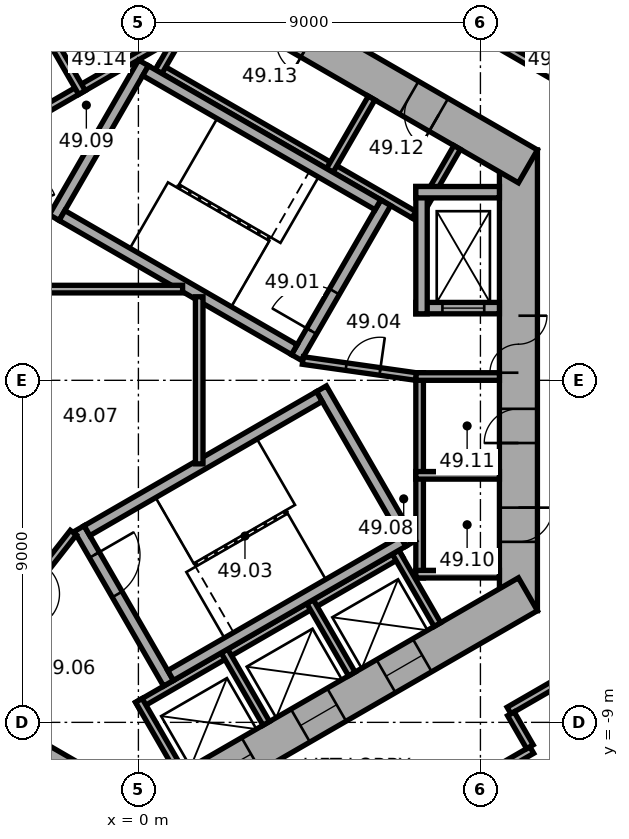
"""IFC4 building model, lengths in metres.
Left out: names, types, materials, properties, quantities, classifications, styles, units other than length and angle.
Written with IfcOpenShell. Run it as: python <this file> out.ifc"""

import sys

from ifc_helpers import new_model, si_unit, direction, frame, frame_2d, origin, place, context, subcontext, project, spatial, rectangle, extrude, element, fill, save


model = new_model("IFC4")
c1 = context("Model", 3, precision=1e-05, world=origin(), true_north=direction((0.0, 1.0)))
c2 = subcontext(c1, "Body", "Model", "MODEL_VIEW")
j1 = project(units=[si_unit("LENGTHUNIT", "METRE"), si_unit("PLANEANGLEUNIT", "RADIAN")], contexts=[c1])
p1 = place(None, origin())
s1 = spatial("IfcSite", under=j1, at=p1, CompositionType="ELEMENT")
p2 = place(p1, origin())
s2 = spatial("IfcBuilding", under=s1, at=p2, CompositionType="ELEMENT")
p3 = place(p2, frame((0.0, 0.0, 198.4)))
s3 = spatial("IfcBuildingStorey", under=s2, at=p3, CompositionType="ELEMENT", Elevation=198.4)
p4 = place(p3, frame((10.0, -6.062, 0.0), z_axis=(0.0, 0.0, 1.0), x_axis=(0.0, 1.0, 0.0)))
e1 = element("IfcWall", 1, at=p4, inside=s3, PredefinedType="SHEAR", context=c2, shape_type="SweptSolid", body=[
    extrude(rectangle(XDim=12.125, YDim=1.0, at=frame_2d((6.062, 0.0))), origin(), (0.0, 0.0, 1.0), 3.7),
])
p5 = place(p4, frame((6.262, 0.0, 0.0)))
e2 = element("IfcOpeningElement", 2, at=p5, cuts=e1, PredefinedType="OPENING", context=c2, shape_type="SweptSolid", body=[
    extrude(rectangle(XDim=1.5, YDim=2.1, at=frame_2d((0.75, 1.05))), frame((0.0, 0.51, 0.0), z_axis=(0.0, -1.0, 0.0), x_axis=(1.0, 0.0, 0.0)), (0.0, 0.0, 1.0), 1.02),
])
p6 = place(p4, frame((1.812, 0.0, 0.0)))
e3 = element("IfcOpeningElement", 3, at=p6, cuts=e1, PredefinedType="OPENING", context=c2, shape_type="SweptSolid", body=[
    extrude(rectangle(XDim=0.9, YDim=2.1, at=frame_2d((0.45, 1.05))), frame((0.0, 0.51, 0.0), z_axis=(0.0, -1.0, 0.0), x_axis=(1.0, 0.0, 0.0)), (0.0, 0.0, 1.0), 1.02),
])
p7 = place(p4, frame((4.412, 0.0, 0.0)))
e4 = element("IfcOpeningElement", 4, at=p7, cuts=e1, PredefinedType="OPENING", context=c2, shape_type="SweptSolid", body=[
    extrude(rectangle(XDim=0.9, YDim=2.1, at=frame_2d((0.45, 1.05))), frame((0.0, 0.51, 0.0), z_axis=(0.0, -1.0, 0.0), x_axis=(1.0, 0.0, 0.0)), (0.0, 0.0, 1.0), 1.02),
])
p8 = place(p3, frame((10.25, 5.629, 0.0), z_axis=(0.0, 0.0, 1.0), x_axis=(-0.866022616891, 0.50000482701, 0.0)))
e5 = element("IfcWall", 5, at=p8, inside=s3, PredefinedType="SHEAR", context=c2, shape_type="SweptSolid", body=[
    extrude(rectangle(XDim=12.125, YDim=1.0, at=frame_2d((6.062, 0.0))), origin(), (0.0, 0.0, 1.0), 3.7),
])
p9 = place(p8, frame((2.712, 0.0, 0.0)))
e6 = element("IfcOpeningElement", 6, at=p9, cuts=e5, PredefinedType="OPENING", context=c2, shape_type="SweptSolid", body=[
    extrude(rectangle(XDim=0.9, YDim=2.1, at=frame_2d((0.45, 1.05))), frame((0.0, 0.51, 0.0), z_axis=(0.0, -1.0, 0.0), x_axis=(1.0, 0.0, 0.0)), (0.0, 0.0, 1.0), 1.02),
])
p10 = place(p8, frame((6.612, 0.0, 0.0)))
e7 = element("IfcOpeningElement", 7, at=p10, cuts=e5, PredefinedType="OPENING", context=c2, shape_type="SweptSolid", body=[
    extrude(rectangle(XDim=0.9, YDim=2.1, at=frame_2d((0.45, 1.05))), frame((0.0, 0.51, 0.0), z_axis=(0.0, -1.0, 0.0), x_axis=(1.0, 0.0, 0.0)), (0.0, 0.0, 1.0), 1.02),
])
p11 = place(p3, frame((0.25, 11.691, 0.0), z_axis=(0.0, 0.0, 1.0), x_axis=(-0.866022616891, -0.50000482701, 0.0)))
e8 = element("IfcWall", 8, at=p11, inside=s3, PredefinedType="SHEAR", context=c2, shape_type="SweptSolid", body=[
    extrude(rectangle(XDim=12.125, YDim=1.0, at=frame_2d((6.062, 0.0))), origin(), (0.0, 0.0, 1.0), 3.7),
])
p12 = place(p11, frame((6.262, 0.0, 0.0)))
e9 = element("IfcOpeningElement", 9, at=p12, cuts=e8, PredefinedType="OPENING", context=c2, shape_type="SweptSolid", body=[
    extrude(rectangle(XDim=1.5, YDim=2.1, at=frame_2d((0.75, 1.05))), frame((0.0, 0.51, 0.0), z_axis=(0.0, -1.0, 0.0), x_axis=(1.0, 0.0, 0.0)), (0.0, 0.0, 1.0), 1.02),
])
p13 = place(p11, frame((1.812, 0.0, 0.0)))
e10 = element("IfcOpeningElement", 10, at=p13, cuts=e8, PredefinedType="OPENING", context=c2, shape_type="SweptSolid", body=[
    extrude(rectangle(XDim=0.9, YDim=2.1, at=frame_2d((0.45, 1.05))), frame((0.0, 0.51, 0.0), z_axis=(0.0, -1.0, 0.0), x_axis=(1.0, 0.0, 0.0)), (0.0, 0.0, 1.0), 1.02),
])
p14 = place(p11, frame((4.412, 0.0, 0.0)))
e11 = element("IfcOpeningElement", 11, at=p14, cuts=e8, PredefinedType="OPENING", context=c2, shape_type="SweptSolid", body=[
    extrude(rectangle(XDim=0.9, YDim=2.1, at=frame_2d((0.45, 1.05))), frame((0.0, 0.51, 0.0), z_axis=(0.0, -1.0, 0.0), x_axis=(1.0, 0.0, 0.0)), (0.0, 0.0, 1.0), 1.02),
])
p15 = place(p3, frame((-10.25, -5.629, 0.0), z_axis=(0.0, 0.0, 1.0), x_axis=(0.866022616891, -0.50000482701, 0.0)))
e12 = element("IfcWall", 12, at=p15, inside=s3, PredefinedType="SHEAR", context=c2, shape_type="SweptSolid", body=[
    extrude(rectangle(XDim=12.125, YDim=1.0, at=frame_2d((6.062, 0.0))), origin(), (0.0, 0.0, 1.0), 3.7),
])
p16 = place(p15, frame((6.262, 0.0, 0.0)))
e13 = element("IfcOpeningElement", 13, at=p16, cuts=e12, PredefinedType="OPENING", context=c2, shape_type="SweptSolid", body=[
    extrude(rectangle(XDim=1.5, YDim=2.1, at=frame_2d((0.75, 1.05))), frame((0.0, 0.51, 0.0), z_axis=(0.0, -1.0, 0.0), x_axis=(1.0, 0.0, 0.0)), (0.0, 0.0, 1.0), 1.02),
])
p17 = place(p15, frame((1.712, 0.0, 0.0)))
e14 = element("IfcOpeningElement", 14, at=p17, cuts=e12, PredefinedType="OPENING", context=c2, shape_type="SweptSolid", body=[
    extrude(rectangle(XDim=1.1, YDim=2.1, at=frame_2d((0.55, 1.05))), frame((0.0, 0.51, 0.0), z_axis=(0.0, -1.0, 0.0), x_axis=(1.0, 0.0, 0.0)), (0.0, 0.0, 1.0), 1.02),
])
p18 = place(p15, frame((4.312, 0.0, 0.0)))
e15 = element("IfcOpeningElement", 15, at=p18, cuts=e12, PredefinedType="OPENING", context=c2, shape_type="SweptSolid", body=[
    extrude(rectangle(XDim=1.1, YDim=2.1, at=frame_2d((0.55, 1.05))), frame((0.0, 0.51, 0.0), z_axis=(0.0, -1.0, 0.0), x_axis=(1.0, 0.0, 0.0)), (0.0, 0.0, 1.0), 1.02),
])
p19 = place(p3, frame((-0.25, -11.691, 0.0), z_axis=(0.0, 0.0, 1.0), x_axis=(0.866022616891, 0.50000482701, 0.0)))
e16 = element("IfcWall", 16, at=p19, inside=s3, PredefinedType="SHEAR", context=c2, shape_type="SweptSolid", body=[
    extrude(rectangle(XDim=12.125, YDim=1.0, at=frame_2d((6.062, 0.0))), origin(), (0.0, 0.0, 1.0), 3.7),
])
p20 = place(p19, frame((2.612, 0.0, 0.0)))
e17 = element("IfcOpeningElement", 17, at=p20, cuts=e16, PredefinedType="OPENING", context=c2, shape_type="SweptSolid", body=[
    extrude(rectangle(XDim=1.1, YDim=2.1, at=frame_2d((0.55, 1.05))), frame((0.0, 0.51, 0.0), z_axis=(0.0, -1.0, 0.0), x_axis=(1.0, 0.0, 0.0)), (0.0, 0.0, 1.0), 1.02),
])
p21 = place(p19, frame((5.212, 0.0, 0.0)))
e18 = element("IfcOpeningElement", 18, at=p21, cuts=e16, PredefinedType="OPENING", context=c2, shape_type="SweptSolid", body=[
    extrude(rectangle(XDim=1.1, YDim=2.1, at=frame_2d((0.55, 1.05))), frame((0.0, 0.51, 0.0), z_axis=(0.0, -1.0, 0.0), x_axis=(1.0, 0.0, 0.0)), (0.0, 0.0, 1.0), 1.02),
])
p22 = place(p19, frame((7.812, 0.0, 0.0)))
e19 = element("IfcOpeningElement", 19, at=p22, cuts=e16, PredefinedType="OPENING", context=c2, shape_type="SweptSolid", body=[
    extrude(rectangle(XDim=1.1, YDim=2.1, at=frame_2d((0.55, 1.05))), frame((0.0, 0.51, 0.0), z_axis=(0.0, -1.0, 0.0), x_axis=(1.0, 0.0, 0.0)), (0.0, 0.0, 1.0), 1.02),
])
p23 = place(p3, frame((7.4, -5.2, 0.0), z_axis=(0.0, 0.0, 1.0), x_axis=(0.0, 1.0, 0.0)))
e20 = element("IfcWall", 20, at=p23, inside=s3, PredefinedType="PARTITIONING", context=c2, shape_type="SweptSolid", body=[
    extrude(rectangle(XDim=5.4, YDim=0.2, at=frame_2d((2.7, 0.0))), origin(), (0.0, 0.0, 1.0), 3.42),
])
for number, where, z_axis, x_axis in (
    (21, (7.3, -5.1, 0.0), (0.0, 0.0, 1.0), (1.0, 0.0, 0.0)),
    (22, (7.3, -2.5, 0.0), (0.0, 0.0, 1.0), (1.0, 0.0, 0.0)),
    (23, (7.3, 0.1, 0.0), (0.0, 0.0, 1.0), (1.0, 0.0, 0.0)),
):
    element("IfcWall", number, at=place(p3, frame(where, z_axis=z_axis, x_axis=x_axis)), inside=s3, PredefinedType="PARTITIONING", context=c2, shape_type="SweptSolid", body=[
        extrude(rectangle(XDim=2.2, YDim=0.2, at=frame_2d((1.1, 0.0))), origin(), (0.0, 0.0, 1.0), 3.42),
    ])
p24 = place(p3, frame((7.424, 4.259, 0.0), z_axis=(0.0, 0.0, 1.0), x_axis=(-0.866026010844, 0.49999894854, 0.0)))
e24 = element("IfcWall", 24, at=p24, inside=s3, PredefinedType="PARTITIONING", context=c2, shape_type="SweptSolid", body=[
    extrude(rectangle(XDim=8.0, YDim=0.2, at=frame_2d((4.0, 0.0))), origin(), (0.0, 0.0, 1.0), 3.42),
])
for number, where, z_axis, x_axis in (
    (25, (7.287, 4.222, 0.0), (0.0, 0.0, 1.0), (0.5, 0.866, 0.0)),
    (26, (5.036, 5.522, 0.0), (0.0, 0.0, 1.0), (0.5, 0.866, 0.0)),
    (27, (0.532, 8.122, 0.0), (0.0, 0.0, 1.0), (0.5, 0.866, 0.0)),
):
    element("IfcWall", number, at=place(p3, frame(where, z_axis=z_axis, x_axis=x_axis)), inside=s3, PredefinedType="PARTITIONING", context=c2, shape_type="SweptSolid", body=[
        extrude(rectangle(XDim=2.2, YDim=0.2, at=frame_2d((1.1, 0.0))), origin(), (0.0, 0.0, 1.0), 3.42),
    ])
p25 = place(p3, frame((0.803, 9.009, 0.0), z_axis=(0.0, 0.0, 1.0), x_axis=(-0.866028230842, -0.499995103361, 0.0)))
e28 = element("IfcWall", 28, at=p25, inside=s3, PredefinedType="PARTITIONING", context=c2, shape_type="SweptSolid", body=[
    extrude(rectangle(XDim=5.4, YDim=0.2, at=frame_2d((2.7, 0.0))), origin(), (0.0, 0.0, 1.0), 3.42),
])
p26 = place(p3, frame((-1.485, 7.572, 0.0), z_axis=(0.0, 0.0, 1.0), x_axis=(-0.50002983664, 0.866008176907, 0.0)))
e29 = element("IfcWall", 29, at=p26, inside=s3, PredefinedType="PARTITIONING", context=c2, shape_type="SweptSolid", body=[
    extrude(rectangle(XDim=2.2, YDim=0.2, at=frame_2d((1.1, 0.0))), origin(), (0.0, 0.0, 1.0), 3.42),
])
p27 = place(p3, frame((-0.024, -8.559, 0.0), z_axis=(0.0, 0.0, 1.0), x_axis=(0.866026010844, 0.49999894854, 0.0)))
e30 = element("IfcWall", 30, at=p27, inside=s3, PredefinedType="PARTITIONING", context=c2, shape_type="SweptSolid", body=[
    extrude(rectangle(XDim=8.0, YDim=0.2, at=frame_2d((4.0, 0.0))), origin(), (0.0, 0.0, 1.0), 3.42),
])
for number, where, z_axis, x_axis in (
    (31, (0.013, -8.422, 0.0), (0.0, 0.0, 1.0), (0.5, -0.866, 0.0)),
    (32, (2.264, -7.122, 0.0), (0.0, 0.0, 1.0), (0.5, -0.866, 0.0)),
    (33, (4.516, -5.822, 0.0), (0.0, 0.0, 1.0), (0.5, -0.866, 0.0)),
    (34, (6.768, -4.522, 0.0), (0.0, 0.0, 1.0), (0.5, -0.866, 0.0)),
):
    element("IfcWall", number, at=place(p3, frame(where, z_axis=z_axis, x_axis=x_axis)), inside=s3, PredefinedType="PARTITIONING", context=c2, shape_type="SweptSolid", body=[
        extrude(rectangle(XDim=2.2, YDim=0.2, at=frame_2d((1.1, 0.0))), origin(), (0.0, 0.0, 1.0), 3.42),
    ])
p28 = place(p3, frame((4.158, 0.602, 0.0), z_axis=(0.0, 0.0, 1.0), x_axis=(0.499977259774, 0.866038532462, 0.0)))
e35 = element("IfcWall", 35, at=p28, inside=s3, PredefinedType="SHEAR", context=c2, shape_type="SweptSolid", body=[
    extrude(rectangle(XDim=4.7, YDim=0.3, at=frame_2d((2.35, 0.0))), origin(), (0.0, 0.0, 1.0), 3.42),
])
p29 = place(p28, frame((0.8, 0.0, 0.0)))
e36 = element("IfcOpeningElement", 36, at=p29, cuts=e35, PredefinedType="OPENING", context=c2, shape_type="SweptSolid", body=[
    extrude(rectangle(XDim=1.2, YDim=2.1, at=frame_2d((0.6, 1.05))), frame((0.0, 0.16, 0.0), z_axis=(0.0, -1.0, 0.0), x_axis=(1.0, 0.0, 0.0)), (0.0, 0.0, 1.0), 0.32),
])
p30 = place(p3, frame((-2.216, 4.282, 0.0), z_axis=(0.0, 0.0, 1.0), x_axis=(0.499977259774, 0.866038532462, 0.0)))
e37 = element("IfcWall", 37, at=p30, inside=s3, PredefinedType="SHEAR", context=c2, shape_type="SweptSolid", body=[
    extrude(rectangle(XDim=4.7, YDim=0.3, at=frame_2d((2.35, 0.0))), origin(), (0.0, 0.0, 1.0), 3.42),
])
for number, where, z_axis, x_axis in (
    (38, (4.103, 0.807, 0.0), (0.0, 0.0, 1.0), (-0.866, 0.5, 0.0)),
    (39, (6.303, 4.617, 0.0), (0.0, 0.0, 1.0), (-0.866, 0.5, 0.0)),
):
    element("IfcWall", number, at=place(p3, frame(where, z_axis=z_axis, x_axis=x_axis)), inside=s3, PredefinedType="SHEAR", context=c2, shape_type="SweptSolid", body=[
        extrude(rectangle(XDim=7.06, YDim=0.3, at=frame_2d((3.53, 0.0))), origin(), (0.0, 0.0, 1.0), 3.42),
    ])
p31 = place(p3, frame((-1.558, -3.902, 0.0), z_axis=(0.0, 0.0, 1.0), x_axis=(0.499977259774, -0.866038532462, 0.0)))
e40 = element("IfcWall", 40, at=p31, inside=s3, PredefinedType="SHEAR", context=c2, shape_type="SweptSolid", body=[
    extrude(rectangle(XDim=4.7, YDim=0.3, at=frame_2d((2.35, 0.0))), origin(), (0.0, 0.0, 1.0), 3.42),
])
p32 = place(p31, frame((0.8, 0.0, 0.0)))
e41 = element("IfcOpeningElement", 41, at=p32, cuts=e40, PredefinedType="OPENING", context=c2, shape_type="SweptSolid", body=[
    extrude(rectangle(XDim=1.2, YDim=2.1, at=frame_2d((0.6, 1.05))), frame((0.0, 0.16, 0.0), z_axis=(0.0, -1.0, 0.0), x_axis=(1.0, 0.0, 0.0)), (0.0, 0.0, 1.0), 0.32),
])
p33 = place(p3, frame((4.816, -0.222, 0.0), z_axis=(0.0, 0.0, 1.0), x_axis=(0.499977259774, -0.866038532462, 0.0)))
e42 = element("IfcWall", 42, at=p33, inside=s3, PredefinedType="SHEAR", context=c2, shape_type="SweptSolid", body=[
    extrude(rectangle(XDim=4.7, YDim=0.3, at=frame_2d((2.35, 0.0))), origin(), (0.0, 0.0, 1.0), 3.42),
])
for number, where, z_axis, x_axis in (
    (43, (-1.353, -3.957, 0.0), (0.0, 0.0, 1.0), (0.866, 0.5, 0.0)),
    (44, (0.847, -7.767, 0.0), (0.0, 0.0, 1.0), (0.866, 0.5, 0.0)),
):
    element("IfcWall", number, at=place(p3, frame(where, z_axis=z_axis, x_axis=x_axis)), inside=s3, PredefinedType="SHEAR", context=c2, shape_type="SweptSolid", body=[
        extrude(rectangle(XDim=7.06, YDim=0.3, at=frame_2d((3.53, 0.0))), origin(), (0.0, 0.0, 1.0), 3.42),
    ])
p34 = place(p3, frame((7.3, 1.9, 0.0), z_axis=(0.0, 0.0, 1.0), x_axis=(1.0, 0.0, 0.0)))
e45 = element("IfcWall", 45, at=p34, inside=s3, PredefinedType="SHEAR", context=c2, shape_type="SweptSolid", body=[
    extrude(rectangle(XDim=2.2, YDim=0.3, at=frame_2d((1.1, 0.0))), origin(), (0.0, 0.0, 1.0), 3.42),
])
p35 = place(p34, frame((0.7, 0.0, 0.0)))
e46 = element("IfcOpeningElement", 46, at=p35, cuts=e45, PredefinedType="OPENING", context=c2, shape_type="SweptSolid", body=[
    extrude(rectangle(XDim=1.1, YDim=2.1, at=frame_2d((0.55, 1.05))), frame((0.0, 0.16, 0.0), z_axis=(0.0, -1.0, 0.0), x_axis=(1.0, 0.0, 0.0)), (0.0, 0.0, 1.0), 0.32),
])
p36 = place(p3, frame((7.45, 1.75, 0.0), z_axis=(0.0, 0.0, 1.0), x_axis=(0.0, 1.0, 0.0)))
e47 = element("IfcWall", 47, at=p36, inside=s3, PredefinedType="SHEAR", context=c2, shape_type="SweptSolid", body=[
    extrude(rectangle(XDim=3.35, YDim=0.3, at=frame_2d((1.675, 0.0))), origin(), (0.0, 0.0, 1.0), 3.42),
])
p37 = place(p3, frame((7.3, 4.95, 0.0), z_axis=(0.0, 0.0, 1.0), x_axis=(1.0, 0.0, 0.0)))
e48 = element("IfcWall", 48, at=p37, inside=s3, PredefinedType="SHEAR", context=c2, shape_type="SweptSolid", body=[
    extrude(rectangle(XDim=2.2, YDim=0.3, at=frame_2d((1.1, 0.0))), origin(), (0.0, 0.0, 1.0), 3.42),
])
p38 = place(p3, frame((4.327, 0.521, 0.0), z_axis=(0.0, 0.0, 1.0), x_axis=(0.990124376366, -0.14019172346, 0.0)))
e49 = element("IfcWall", 49, at=p38, inside=s3, PredefinedType="PARTITIONING", context=c2, shape_type="SweptSolid", body=[
    extrude(rectangle(XDim=3.002, YDim=0.2, at=frame_2d((1.501, 0.0))), origin(), (0.0, 0.0, 1.0), 3.42),
])
p39 = place(p38, frame((1.15, 0.0, 0.0)))
e50 = element("IfcOpeningElement", 50, at=p39, cuts=e49, PredefinedType="OPENING", context=c2, shape_type="SweptSolid", body=[
    extrude(rectangle(XDim=0.9, YDim=2.1, at=frame_2d((0.45, 1.05))), frame((0.0, 0.11, 0.0), z_axis=(0.0, -1.0, 0.0), x_axis=(1.0, 0.0, 0.0)), (0.0, 0.0, 1.0), 0.22),
])
p40 = place(p3, frame((-1.712, -4.008, 0.0), z_axis=(0.0, 0.0, 1.0), x_axis=(-0.616549420702, -0.787316208287, 0.0)))
e51 = element("IfcWall", 51, at=p40, inside=s3, PredefinedType="PARTITIONING", context=c2, shape_type="SweptSolid", body=[
    extrude(rectangle(XDim=3.002, YDim=0.2, at=frame_2d((1.501, 0.0))), origin(), (0.0, 0.0, 1.0), 3.42),
])
p41 = place(p40, frame((1.15, 0.0, 0.0)))
e52 = element("IfcOpeningElement", 52, at=p41, cuts=e51, PredefinedType="OPENING", context=c2, shape_type="SweptSolid", body=[
    extrude(rectangle(XDim=0.9, YDim=2.1, at=frame_2d((0.45, 1.05))), frame((0.0, 0.11, 0.0), z_axis=(0.0, -1.0, 0.0), x_axis=(1.0, 0.0, 0.0)), (0.0, 0.0, 1.0), 0.22),
])
p42 = place(p3, frame((-2.72, 2.4, 0.0), z_axis=(0.0, 0.0, 1.0), x_axis=(1.0, 0.0, 0.0)))
e53 = element("IfcWall", 53, at=p42, inside=s3, PredefinedType="PARTITIONING", context=c2, shape_type="SweptSolid", body=[
    extrude(rectangle(XDim=3.883, YDim=0.2, at=frame_2d((1.941, 0.0))), origin(), (0.0, 0.0, 1.0), 3.42),
])
p43 = place(p3, frame((1.6, -2.198, 0.0), z_axis=(0.0, 0.0, 1.0), x_axis=(0.0, 1.0, 0.0)))
e54 = element("IfcWall", 54, at=p43, inside=s3, PredefinedType="PARTITIONING", context=c2, shape_type="SweptSolid", body=[
    extrude(rectangle(XDim=4.397, YDim=0.2, at=frame_2d((2.198, 0.0))), origin(), (0.0, 0.0, 1.0), 3.42),
])
p44 = place(p3, frame((2.816, -14.079, 0.0), z_axis=(0.0, 0.0, 1.0), x_axis=(0.866021128829, 0.500007404367, 0.0)))
e55 = element("IfcWall", 55, at=p44, inside=s3, PredefinedType="PARTITIONING", context=c2, shape_type="SweptSolid", body=[
    extrude(rectangle(XDim=8.702, YDim=0.2, at=frame_2d((4.351, 0.0))), origin(), (0.0, 0.0, 1.0), 3.42),
])
p45 = place(p44, frame((2.714, 0.0, 0.0)))
e56 = element("IfcOpeningElement", 56, at=p45, cuts=e55, PredefinedType="OPENING", context=c2, shape_type="SweptSolid", body=[
    extrude(rectangle(XDim=1.0, YDim=2.1, at=frame_2d((0.5, 1.05))), frame((0.0, 0.11, 0.0), z_axis=(0.0, -1.0, 0.0), x_axis=(1.0, 0.0, 0.0)), (0.0, 0.0, 1.0), 0.22),
])
p46 = place(p3, frame((9.752, -8.688, 0.0), z_axis=(0.0, 0.0, 1.0), x_axis=(0.865974105138, 0.500088841337, 0.0)))
e57 = element("IfcWall", 57, at=p46, inside=s3, PredefinedType="PARTITIONING", context=c2, shape_type="SweptSolid", body=[
    extrude(rectangle(XDim=1.961, YDim=0.2, at=frame_2d((0.98, 0.0))), origin(), (0.0, 0.0, 1.0), 3.42),
])
p47 = place(p3, frame((10.302, -9.642, 0.0), z_axis=(0.0, 0.0, 1.0), x_axis=(-0.500074377092, 0.865982457891, 0.0)))
e58 = element("IfcWall", 58, at=p47, inside=s3, PredefinedType="PARTITIONING", context=c2, shape_type="SweptSolid", body=[
    extrude(rectangle(XDim=1.001, YDim=0.2, at=frame_2d((0.5, 0.0))), origin(), (0.0, 0.0, 1.0), 3.42),
])
p48 = place(p3, frame((11.233, 7.833, 0.0), z_axis=(0.0, 0.0, 1.0), x_axis=(-0.866002813504, 0.500039125473, 0.0)))
e59 = element("IfcWall", 59, at=p48, inside=s3, PredefinedType="PARTITIONING", context=c2, shape_type="SweptSolid", body=[
    extrude(rectangle(XDim=3.804, YDim=0.2, at=frame_2d((1.902, 0.0))), origin(), (0.0, 0.0, 1.0), 3.42),
])
p49 = place(p5, origin())
e60 = element("IfcDoor", 60, at=p49, inside=s3, OperationType="DOUBLE_DOOR_SINGLE_SWING", PredefinedType="DOOR", context=c2, shape_type="SweptSolid", body=[
    extrude(rectangle(XDim=1.5, YDim=2.1, at=frame_2d((0.75, 1.05))), frame((0.0, 0.025, 0.0), z_axis=(0.0, -1.0, 0.0), x_axis=(1.0, 0.0, 0.0)), (0.0, 0.0, 1.0), 0.05),
])
fill(e2, e60)
p50 = place(p29, origin())
e61 = element("IfcDoor", 61, at=p50, inside=s3, OperationType="SINGLE_SWING_RIGHT", PredefinedType="DOOR", context=c2, shape_type="SweptSolid", body=[
    extrude(rectangle(XDim=1.2, YDim=2.1, at=frame_2d((0.6, 1.05))), frame((0.0, 0.025, 0.0), z_axis=(0.0, -1.0, 0.0), x_axis=(1.0, 0.0, 0.0)), (0.0, 0.0, 1.0), 0.05),
])
fill(e36, e61)
p51 = place(p32, origin())
e62 = element("IfcDoor", 62, at=p51, inside=s3, OperationType="SINGLE_SWING_RIGHT", PredefinedType="DOOR", context=c2, shape_type="SweptSolid", body=[
    extrude(rectangle(XDim=1.2, YDim=2.1, at=frame_2d((0.6, 1.05))), frame((0.0, 0.025, 0.0), z_axis=(0.0, -1.0, 0.0), x_axis=(1.0, 0.0, 0.0)), (0.0, 0.0, 1.0), 0.05),
])
fill(e41, e62)
p52 = place(p39, origin())
e63 = element("IfcDoor", 63, at=p52, inside=s3, OperationType="SINGLE_SWING_LEFT", PredefinedType="DOOR", context=c2, shape_type="SweptSolid", body=[
    extrude(rectangle(XDim=0.9, YDim=2.1, at=frame_2d((0.45, 1.05))), frame((0.0, 0.025, 0.0), z_axis=(0.0, -1.0, 0.0), x_axis=(1.0, 0.0, 0.0)), (0.0, 0.0, 1.0), 0.05),
])
fill(e50, e63)
p53 = place(p6, origin())
e64 = element("IfcDoor", 64, at=p53, inside=s3, OperationType="SINGLE_SWING_LEFT", PredefinedType="DOOR", context=c2, shape_type="SweptSolid", body=[
    extrude(rectangle(XDim=0.9, YDim=2.1, at=frame_2d((0.45, 1.05))), frame((0.0, 0.025, 0.0), z_axis=(0.0, -1.0, 0.0), x_axis=(1.0, 0.0, 0.0)), (0.0, 0.0, 1.0), 0.05),
])
fill(e3, e64)
p54 = place(p7, origin())
e65 = element("IfcDoor", 65, at=p54, inside=s3, OperationType="SINGLE_SWING_LEFT", PredefinedType="DOOR", context=c2, shape_type="SweptSolid", body=[
    extrude(rectangle(XDim=0.9, YDim=2.1, at=frame_2d((0.45, 1.05))), frame((0.0, 0.025, 0.0), z_axis=(0.0, -1.0, 0.0), x_axis=(1.0, 0.0, 0.0)), (0.0, 0.0, 1.0), 0.05),
])
fill(e4, e65)
p55 = place(p9, origin())
e66 = element("IfcDoor", 66, at=p55, inside=s3, OperationType="SINGLE_SWING_LEFT", PredefinedType="DOOR", context=c2, shape_type="SweptSolid", body=[
    extrude(rectangle(XDim=0.9, YDim=2.1, at=frame_2d((0.45, 1.05))), frame((0.0, 0.025, 0.0), z_axis=(0.0, -1.0, 0.0), x_axis=(1.0, 0.0, 0.0)), (0.0, 0.0, 1.0), 0.05),
])
fill(e6, e66)
p56 = place(p35, origin())
e67 = element("IfcDoor", 67, at=p56, inside=s3, OperationType="DOUBLE_DOOR_SLIDING", PredefinedType="DOOR", context=c2, shape_type="SweptSolid", body=[
    extrude(rectangle(XDim=1.1, YDim=2.1, at=frame_2d((0.55, 1.05))), frame((0.0, 0.025, 0.0), z_axis=(0.0, -1.0, 0.0), x_axis=(1.0, 0.0, 0.0)), (0.0, 0.0, 1.0), 0.05),
])
fill(e46, e67)
p57 = place(p20, origin())
e68 = element("IfcDoor", 68, at=p57, inside=s3, OperationType="DOUBLE_DOOR_SLIDING", PredefinedType="DOOR", context=c2, shape_type="SweptSolid", body=[
    extrude(rectangle(XDim=1.1, YDim=2.1, at=frame_2d((0.55, 1.05))), frame((0.0, 0.025, 0.0), z_axis=(0.0, -1.0, 0.0), x_axis=(1.0, 0.0, 0.0)), (0.0, 0.0, 1.0), 0.05),
])
fill(e17, e68)
p58 = place(p21, origin())
e69 = element("IfcDoor", 69, at=p58, inside=s3, OperationType="DOUBLE_DOOR_SLIDING", PredefinedType="DOOR", context=c2, shape_type="SweptSolid", body=[
    extrude(rectangle(XDim=1.1, YDim=2.1, at=frame_2d((0.55, 1.05))), frame((0.0, 0.025, 0.0), z_axis=(0.0, -1.0, 0.0), x_axis=(1.0, 0.0, 0.0)), (0.0, 0.0, 1.0), 0.05),
])
fill(e18, e69)
p59 = place(p22, origin())
e70 = element("IfcDoor", 70, at=p59, inside=s3, OperationType="DOUBLE_DOOR_SLIDING", PredefinedType="DOOR", context=c2, shape_type="SweptSolid", body=[
    extrude(rectangle(XDim=1.1, YDim=2.1, at=frame_2d((0.55, 1.05))), frame((0.0, 0.025, 0.0), z_axis=(0.0, -1.0, 0.0), x_axis=(1.0, 0.0, 0.0)), (0.0, 0.0, 1.0), 0.05),
])
fill(e19, e70)
save(model, sys.argv[1])
